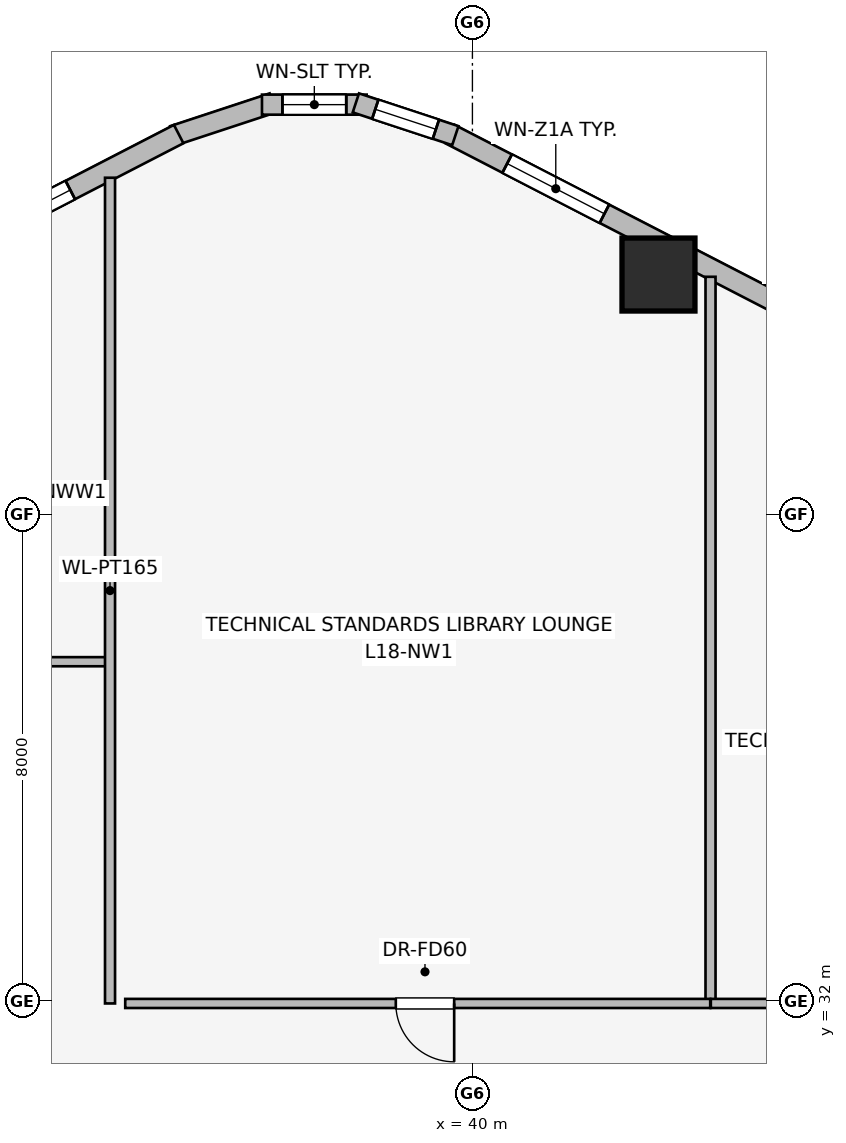
"""IFC4 building model, lengths in metres.
Left out: names, types, materials, properties, quantities, classifications, styles, units other than length and angle.
Written with IfcOpenShell. Run it as: python <this file> out.ifc"""

import sys

from ifc_helpers import new_model, si_unit, direction, frame, frame_2d, origin, origin_2d, place, context, subcontext, project, spatial, rectangle, extrude, element, fill, save


model = new_model("IFC4")
c1 = context("Model", 3, precision=1e-05, world=origin(), true_north=direction((0.0, 1.0)))
c2 = subcontext(c1, "Body", "Model", "MODEL_VIEW")
j1 = project(units=[si_unit("LENGTHUNIT", "METRE"), si_unit("PLANEANGLEUNIT", "RADIAN")], contexts=[c1])
p1 = place(None, origin())
s1 = spatial("IfcSite", under=j1, at=p1, CompositionType="ELEMENT")
p2 = place(p1, origin())
s2 = spatial("IfcBuilding", under=s1, at=p2, CompositionType="ELEMENT")
p3 = place(p2, frame((0.0, 0.0, 70.8)))
s3 = spatial("IfcBuildingStorey", under=s2, at=p3, CompositionType="ELEMENT", Elevation=70.8)
p4 = place(p3, frame((43.06, 43.947, 0.0), z_axis=(0.0, 0.0, 1.0), x_axis=(1.0, 0.0, 0.0)))
e1 = element("IfcColumn", 1, at=p4, inside=s3, PredefinedType="COLUMN", context=c2, shape_type="SweptSolid", body=[
    extrude(rectangle(XDim=1.2, YDim=1.2, at=origin_2d()), origin(), (0.0, 0.0, 1.0), 3.65),
])
p5 = place(p3, frame((39.631, 46.257, 0.0), z_axis=(0.0, 0.0, 1.0), x_axis=(0.888634413993, -0.458616264721, 0.0)))
e2 = element("IfcWall", 2, at=p5, inside=s3, PredefinedType="STANDARD", context=c2, shape_type="SweptSolid", body=[
    extrude(rectangle(XDim=20.531, YDim=0.34, at=frame_2d((10.266, 0.0))), origin(), (0.0, 0.0, 1.0), 2.684),
])
p6 = place(p5, frame((1.058, 0.0, 0.75)))
e3 = element("IfcOpeningElement", 3, at=p6, cuts=e2, PredefinedType="OPENING", context=c2, shape_type="SweptSolid", body=[
    extrude(rectangle(XDim=1.8, YDim=1.5, at=frame_2d((0.9, 0.75))), frame((0.0, 0.18, 0.0), z_axis=(0.0, -1.0, 0.0), x_axis=(1.0, 0.0, 0.0)), (0.0, 0.0, 1.0), 0.36),
])
p7 = place(p5, frame((6.236, 0.0, 0.75)))
e4 = element("IfcOpeningElement", 4, at=p7, cuts=e2, PredefinedType="OPENING", context=c2, shape_type="SweptSolid", body=[
    extrude(rectangle(XDim=1.5, YDim=1.5, at=frame_2d((0.75, 0.75))), frame((0.0, 0.18, 0.0), z_axis=(0.0, -1.0, 0.0), x_axis=(1.0, 0.0, 0.0)), (0.0, 0.0, 1.0), 0.36),
])
p8 = place(p5, frame((9.716, 0.0, 0.75)))
e5 = element("IfcOpeningElement", 5, at=p8, cuts=e2, PredefinedType="OPENING", context=c2, shape_type="SweptSolid", body=[
    extrude(rectangle(XDim=1.5, YDim=1.5, at=frame_2d((0.75, 0.75))), frame((0.0, 0.18, 0.0), z_axis=(0.0, -1.0, 0.0), x_axis=(1.0, 0.0, 0.0)), (0.0, 0.0, 1.0), 0.36),
])
p9 = place(p5, frame((13.195, 0.0, 0.75)))
e6 = element("IfcOpeningElement", 6, at=p9, cuts=e2, PredefinedType="OPENING", context=c2, shape_type="SweptSolid", body=[
    extrude(rectangle(XDim=1.5, YDim=1.5, at=frame_2d((0.75, 0.75))), frame((0.0, 0.18, 0.0), z_axis=(0.0, -1.0, 0.0), x_axis=(1.0, 0.0, 0.0)), (0.0, 0.0, 1.0), 0.36),
])
p10 = place(p5, frame((17.673, 0.0, 0.75)))
e7 = element("IfcOpeningElement", 7, at=p10, cuts=e2, PredefinedType="OPENING", context=c2, shape_type="SweptSolid", body=[
    extrude(rectangle(XDim=1.8, YDim=1.5, at=frame_2d((0.9, 0.75))), frame((0.0, 0.18, 0.0), z_axis=(0.0, -1.0, 0.0), x_axis=(1.0, 0.0, 0.0)), (0.0, 0.0, 1.0), 0.36),
])
p11 = place(p3, frame((35.081, 46.231, 0.0), z_axis=(0.0, 0.0, 1.0), x_axis=(0.94976901097, 0.312951794691, 0.0)))
e8 = element("IfcWall", 8, at=p11, inside=s3, PredefinedType="STANDARD", context=c2, shape_type="SweptSolid", body=[
    extrude(rectangle(XDim=1.722, YDim=0.33, at=frame_2d((0.861, 0.0))), origin(), (0.0, 0.0, 1.0), 3.39),
])
p12 = place(p3, frame((36.539, 46.741, 0.0), z_axis=(0.0, 0.0, 1.0), x_axis=(1.0, 0.0, 0.0)))
e9 = element("IfcWall", 9, at=p12, inside=s3, PredefinedType="STANDARD", context=c2, shape_type="SweptSolid", body=[
    extrude(rectangle(XDim=1.722, YDim=0.33, at=frame_2d((0.861, 0.0))), origin(), (0.0, 0.0, 1.0), 3.39),
])
p13 = place(p12, frame((0.336, 0.0, 0.75)))
e10 = element("IfcOpeningElement", 10, at=p13, cuts=e9, PredefinedType="OPENING", context=c2, shape_type="SweptSolid", body=[
    extrude(rectangle(XDim=1.05, YDim=1.4, at=frame_2d((0.525, 0.7))), frame((0.0, 0.175, 0.0), z_axis=(0.0, -1.0, 0.0), x_axis=(1.0, 0.0, 0.0)), (0.0, 0.0, 1.0), 0.35),
])
p14 = place(p3, frame((38.083, 46.77, 0.0), z_axis=(0.0, 0.0, 1.0), x_axis=(0.94976901097, -0.312951794691, 0.0)))
e11 = element("IfcWall", 11, at=p14, inside=s3, PredefinedType="STANDARD", context=c2, shape_type="SweptSolid", body=[
    extrude(rectangle(XDim=1.722, YDim=0.33, at=frame_2d((0.861, 0.0))), origin(), (0.0, 0.0, 1.0), 3.39),
])
p15 = place(p14, frame((0.336, 0.0, 0.75)))
e12 = element("IfcOpeningElement", 12, at=p15, cuts=e11, PredefinedType="OPENING", context=c2, shape_type="SweptSolid", body=[
    extrude(rectangle(XDim=1.05, YDim=1.4, at=frame_2d((0.525, 0.7))), frame((0.0, 0.175, 0.0), z_axis=(0.0, -1.0, 0.0), x_axis=(1.0, 0.0, 0.0)), (0.0, 0.0, 1.0), 0.35),
])
p16 = place(p3, frame((16.924, 36.841, 0.0), z_axis=(0.0, 0.0, 1.0), x_axis=(0.888634413993, 0.458616264721, 0.0)))
e13 = element("IfcWall", 13, at=p16, inside=s3, PredefinedType="STANDARD", context=c2, shape_type="SweptSolid", body=[
    extrude(rectangle(XDim=20.531, YDim=0.34, at=frame_2d((10.266, 0.0))), origin(), (0.0, 0.0, 1.0), 2.684),
])
p17 = place(p16, frame((2.161, 0.0, 0.75)))
e14 = element("IfcOpeningElement", 14, at=p17, cuts=e13, PredefinedType="OPENING", context=c2, shape_type="SweptSolid", body=[
    extrude(rectangle(XDim=1.05, YDim=1.4, at=frame_2d((0.525, 0.7))), frame((0.0, 0.18, 0.0), z_axis=(0.0, -1.0, 0.0), x_axis=(1.0, 0.0, 0.0)), (0.0, 0.0, 1.0), 0.36),
])
p18 = place(p16, frame((5.903, 0.0, 0.75)))
e15 = element("IfcOpeningElement", 15, at=p18, cuts=e13, PredefinedType="OPENING", context=c2, shape_type="SweptSolid", body=[
    extrude(rectangle(XDim=1.5, YDim=1.5, at=frame_2d((0.75, 0.75))), frame((0.0, 0.18, 0.0), z_axis=(0.0, -1.0, 0.0), x_axis=(1.0, 0.0, 0.0)), (0.0, 0.0, 1.0), 0.36),
])
p19 = place(p16, frame((9.516, 0.0, 0.75)))
e16 = element("IfcOpeningElement", 16, at=p19, cuts=e13, PredefinedType="OPENING", context=c2, shape_type="SweptSolid", body=[
    extrude(rectangle(XDim=1.5, YDim=1.5, at=frame_2d((0.75, 0.75))), frame((0.0, 0.18, 0.0), z_axis=(0.0, -1.0, 0.0), x_axis=(1.0, 0.0, 0.0)), (0.0, 0.0, 1.0), 0.36),
])
p20 = place(p16, frame((13.129, 0.0, 0.75)))
e17 = element("IfcOpeningElement", 17, at=p20, cuts=e13, PredefinedType="OPENING", context=c2, shape_type="SweptSolid", body=[
    extrude(rectangle(XDim=1.5, YDim=1.5, at=frame_2d((0.75, 0.75))), frame((0.0, 0.18, 0.0), z_axis=(0.0, -1.0, 0.0), x_axis=(1.0, 0.0, 0.0)), (0.0, 0.0, 1.0), 0.36),
])
p21 = place(p16, frame((17.476, 0.0, 0.75)))
e18 = element("IfcOpeningElement", 18, at=p21, cuts=e13, PredefinedType="OPENING", context=c2, shape_type="SweptSolid", body=[
    extrude(rectangle(XDim=1.05, YDim=1.4, at=frame_2d((0.525, 0.7))), frame((0.0, 0.18, 0.0), z_axis=(0.0, -1.0, 0.0), x_axis=(1.0, 0.0, 0.0)), (0.0, 0.0, 1.0), 0.36),
])
p22 = place(p3, frame((34.0, 37.58, 0.0), z_axis=(0.0, 0.0, 1.0), x_axis=(-1.0, 0.0, 0.0)))
e19 = element("IfcWall", 19, at=p22, inside=s3, PredefinedType="PARTITIONING", context=c2, shape_type="SweptSolid", body=[
    extrude(rectangle(XDim=15.6, YDim=0.15, at=frame_2d((7.8, 0.0))), origin(), (0.0, 0.0, 1.0), 3.39),
])
p23 = place(p22, frame((5.195, 0.0, 0.0)))
e20 = element("IfcOpeningElement", 20, at=p23, cuts=e19, PredefinedType="OPENING", context=c2, shape_type="SweptSolid", body=[
    extrude(rectangle(XDim=0.96, YDim=2.0, at=frame_2d((0.48, 1.0))), frame((0.0, 0.085, 0.0), z_axis=(0.0, -1.0, 0.0), x_axis=(1.0, 0.0, 0.0)), (0.0, 0.0, 1.0), 0.17),
])
p24 = place(p3, frame((34.04, 31.96, 0.0), z_axis=(0.0, 0.0, 1.0), x_axis=(0.0, 1.0, 0.0)))
e21 = element("IfcWall", 21, at=p24, inside=s3, PredefinedType="PARTITIONING", context=c2, shape_type="SweptSolid", body=[
    extrude(rectangle(XDim=13.579, YDim=0.165, at=frame_2d((6.79, 0.0))), origin(), (0.0, 0.0, 1.0), 3.39),
])
p25 = place(p3, frame((43.916, 31.97, 0.0), z_axis=(0.0, 0.0, 1.0), x_axis=(0.0, 1.0, 0.0)))
e22 = element("IfcWall", 22, at=p25, inside=s3, PredefinedType="PARTITIONING", context=c2, shape_type="SweptSolid", body=[
    extrude(rectangle(XDim=11.94, YDim=0.165, at=frame_2d((5.97, 0.0))), origin(), (0.0, 0.0, 1.0), 3.39),
])
p26 = place(p3, frame((43.911, 31.96, 0.0), z_axis=(0.0, 0.0, 1.0), x_axis=(-1.0, 0.0, 0.0)))
e23 = element("IfcWall", 23, at=p26, inside=s3, PredefinedType="PARTITIONING", context=c2, shape_type="SweptSolid", body=[
    extrude(rectangle(XDim=9.621, YDim=0.15, at=frame_2d((4.811, 0.0))), origin(), (0.0, 0.0, 1.0), 3.39),
])
p27 = place(p26, frame((4.211, 0.0, 0.0)))
e24 = element("IfcOpeningElement", 24, at=p27, cuts=e23, PredefinedType="OPENING", context=c2, shape_type="SweptSolid", body=[
    extrude(rectangle(XDim=0.96, YDim=2.0, at=frame_2d((0.48, 1.0))), frame((0.0, 0.085, 0.0), z_axis=(0.0, -1.0, 0.0), x_axis=(1.0, 0.0, 0.0)), (0.0, 0.0, 1.0), 0.17),
])
p28 = place(p3, frame((60.032, 31.96, 0.0), z_axis=(0.0, 0.0, 1.0), x_axis=(-1.0, 0.0, 0.0)))
e25 = element("IfcWall", 25, at=p28, inside=s3, PredefinedType="PARTITIONING", context=c2, shape_type="SweptSolid", body=[
    extrude(rectangle(XDim=16.111, YDim=0.15, at=frame_2d((8.056, 0.0))), origin(), (0.0, 0.0, 1.0), 3.39),
])
p29 = place(p28, frame((7.695, 0.0, 0.0)))
e26 = element("IfcOpeningElement", 26, at=p29, cuts=e25, PredefinedType="OPENING", context=c2, shape_type="SweptSolid", body=[
    extrude(rectangle(XDim=0.96, YDim=2.0, at=frame_2d((0.48, 1.0))), frame((0.0, 0.085, 0.0), z_axis=(0.0, -1.0, 0.0), x_axis=(1.0, 0.0, 0.0)), (0.0, 0.0, 1.0), 0.17),
])
p30 = place(p6, origin())
e27 = element("IfcWindow", 27, at=p30, inside=s3, PartitioningType="SINGLE_PANEL", PredefinedType="WINDOW", context=c2, shape_type="SweptSolid", body=[
    extrude(rectangle(XDim=1.8, YDim=1.5, at=frame_2d((0.9, 0.75))), frame((0.0, 0.03, 0.0), z_axis=(0.0, -1.0, 0.0), x_axis=(1.0, 0.0, 0.0)), (0.0, 0.0, 1.0), 0.06),
])
fill(e3, e27)
p31 = place(p13, origin())
e28 = element("IfcWindow", 28, at=p31, inside=s3, PartitioningType="SINGLE_PANEL", PredefinedType="WINDOW", context=c2, shape_type="SweptSolid", body=[
    extrude(rectangle(XDim=1.05, YDim=1.4, at=frame_2d((0.525, 0.7))), frame((0.0, 0.03, 0.0), z_axis=(0.0, -1.0, 0.0), x_axis=(1.0, 0.0, 0.0)), (0.0, 0.0, 1.0), 0.06),
])
fill(e10, e28)
p32 = place(p15, origin())
e29 = element("IfcWindow", 29, at=p32, inside=s3, PartitioningType="SINGLE_PANEL", PredefinedType="WINDOW", context=c2, shape_type="SweptSolid", body=[
    extrude(rectangle(XDim=1.05, YDim=1.4, at=frame_2d((0.525, 0.7))), frame((0.0, 0.03, 0.0), z_axis=(0.0, -1.0, 0.0), x_axis=(1.0, 0.0, 0.0)), (0.0, 0.0, 1.0), 0.06),
])
fill(e12, e29)
p33 = place(p21, origin())
e30 = element("IfcWindow", 30, at=p33, inside=s3, PartitioningType="SINGLE_PANEL", PredefinedType="WINDOW", context=c2, shape_type="SweptSolid", body=[
    extrude(rectangle(XDim=1.05, YDim=1.4, at=frame_2d((0.525, 0.7))), frame((0.0, 0.03, 0.0), z_axis=(0.0, -1.0, 0.0), x_axis=(1.0, 0.0, 0.0)), (0.0, 0.0, 1.0), 0.06),
])
fill(e18, e30)
p34 = place(p27, origin())
e31 = element("IfcDoor", 31, at=p34, inside=s3, OperationType="SINGLE_SWING_LEFT", PredefinedType="DOOR", context=c2, shape_type="SweptSolid", body=[
    extrude(rectangle(XDim=0.96, YDim=2.0, at=frame_2d((0.48, 1.0))), frame((0.0, 0.025, 0.0), z_axis=(0.0, -1.0, 0.0), x_axis=(1.0, 0.0, 0.0)), (0.0, 0.0, 1.0), 0.05),
])
fill(e24, e31)
save(model, sys.argv[1])
